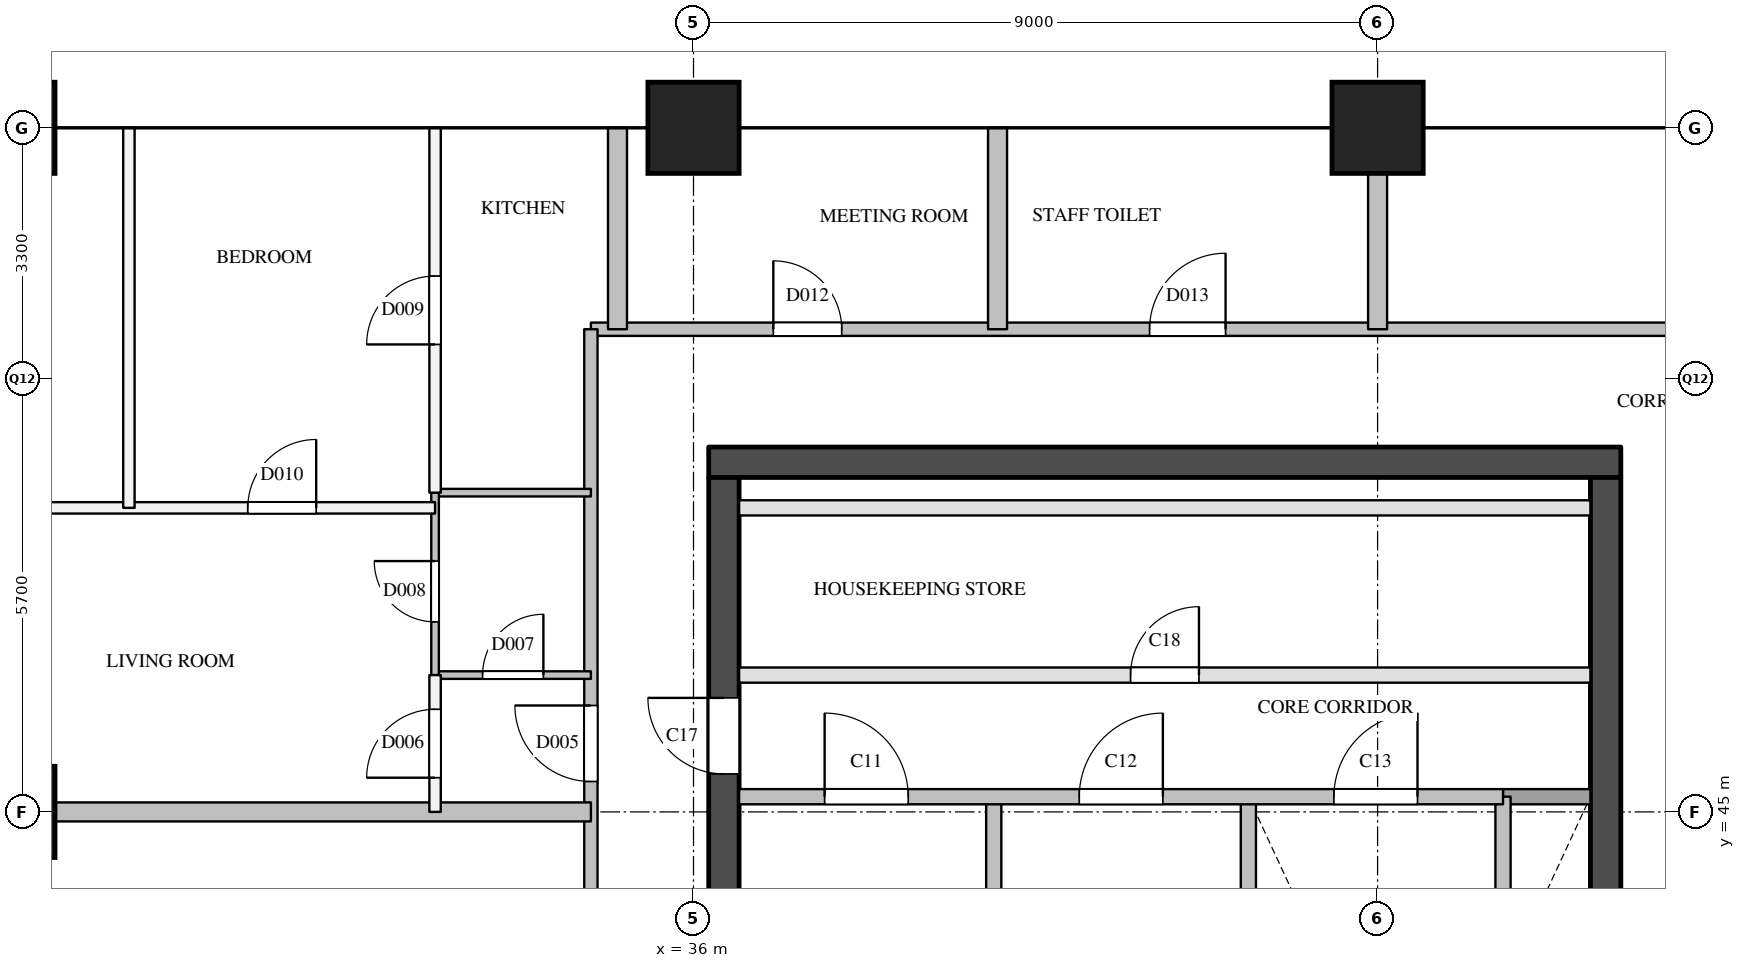
"""IFC4 building model, lengths in metres.
Left out: names, types, materials, properties, quantities, classifications, styles, units other than length and angle.
Written with IfcOpenShell. Run it as: python <this file> out.ifc"""

import sys

from ifc_helpers import new_model, si_unit, direction, frame, frame_2d, origin, origin_2d, place, context, subcontext, project, spatial, rectangle, extrude, element, fill, save


model = new_model("IFC4")
c1 = context("Model", 3, precision=1e-05, world=origin(), true_north=direction((0.0, 1.0)))
c2 = subcontext(c1, "Body", "Model", "MODEL_VIEW")
j1 = project(units=[si_unit("LENGTHUNIT", "METRE"), si_unit("PLANEANGLEUNIT", "RADIAN")], contexts=[c1])
p1 = place(None, origin())
s1 = spatial("IfcSite", under=j1, at=p1, CompositionType="ELEMENT")
p2 = place(p1, origin())
s2 = spatial("IfcBuilding", under=s1, at=p2, CompositionType="ELEMENT")
p3 = place(p2, frame((0.0, 0.0, 257.9)))
s3 = spatial("IfcBuildingStorey", under=s2, at=p3, CompositionType="ELEMENT", Elevation=257.9)
for number, where, z_axis, x_axis in (
    (1, (27.0, 45.0, 0.0), (0.0, 0.0, 1.0), (1.0, 0.0, 0.0)),
    (2, (27.0, 54.0, 0.0), (0.0, 0.0, 1.0), (1.0, 0.0, 0.0)),
    (3, (36.0, 54.0, 0.0), (0.0, 0.0, 1.0), (1.0, 0.0, 0.0)),
    (4, (45.0, 54.0, 0.0), (0.0, 0.0, 1.0), (1.0, 0.0, 0.0)),
):
    element("IfcColumn", number, at=place(p3, frame(where, z_axis=z_axis, x_axis=x_axis)), inside=s3, PredefinedType="COLUMN", context=c2, shape_type="SweptSolid", body=[
        extrude(rectangle(XDim=1.2, YDim=1.2, at=origin_2d()), origin(), (0.0, 0.0, 1.0), 3.9),
    ])
p4 = place(p3, frame((36.2, 49.6, 0.0), z_axis=(0.0, 0.0, 1.0), x_axis=(1.0, 0.0, 0.0)))
e5 = element("IfcWall", 5, at=p4, inside=s3, PredefinedType="SHEAR", context=c2, shape_type="SweptSolid", body=[
    extrude(rectangle(XDim=12.0, YDim=0.4, at=frame_2d((6.0, 0.0))), origin(), (0.0, 0.0, 1.0), 3.6),
])
p5 = place(p3, frame((36.4, 29.1, 0.0), z_axis=(0.0, 0.0, 1.0), x_axis=(0.0, 1.0, 0.0)))
e6 = element("IfcWall", 6, at=p5, inside=s3, PredefinedType="SHEAR", context=c2, shape_type="SweptSolid", body=[
    extrude(rectangle(XDim=20.3, YDim=0.4, at=frame_2d((10.15, 0.0))), origin(), (0.0, 0.0, 1.0), 3.6),
])
p6 = place(p5, frame((3.6, 0.0, 0.0)))
e7 = element("IfcOpeningElement", 7, at=p6, cuts=e6, PredefinedType="OPENING", context=c2, shape_type="SweptSolid", body=[
    extrude(rectangle(XDim=1.8, YDim=2.1, at=frame_2d((0.9, 1.05))), frame((0.0, 0.21, 0.0), z_axis=(0.0, -1.0, 0.0), x_axis=(1.0, 0.0, 0.0)), (0.0, 0.0, 1.0), 0.42),
])
p7 = place(p5, frame((16.4, 0.0, 0.0)))
e8 = element("IfcOpeningElement", 8, at=p7, cuts=e6, PredefinedType="OPENING", context=c2, shape_type="SweptSolid", body=[
    extrude(rectangle(XDim=1.0, YDim=2.1, at=frame_2d((0.5, 1.05))), frame((0.0, 0.21, 0.0), z_axis=(0.0, -1.0, 0.0), x_axis=(1.0, 0.0, 0.0)), (0.0, 0.0, 1.0), 0.42),
])
p8 = place(p3, frame((48.0, 29.1, 0.0), z_axis=(0.0, 0.0, 1.0), x_axis=(0.0, 1.0, 0.0)))
e9 = element("IfcWall", 9, at=p8, inside=s3, PredefinedType="SHEAR", context=c2, shape_type="SweptSolid", body=[
    extrude(rectangle(XDim=20.3, YDim=0.4, at=frame_2d((10.15, 0.0))), origin(), (0.0, 0.0, 1.0), 3.6),
])
p9 = place(p8, frame((12.5, 0.0, 0.0)))
e10 = element("IfcOpeningElement", 10, at=p9, cuts=e9, PredefinedType="OPENING", context=c2, shape_type="SweptSolid", body=[
    extrude(rectangle(XDim=0.7, YDim=2.1, at=frame_2d((0.35, 1.05))), frame((0.0, 0.21, 0.0), z_axis=(0.0, -1.0, 0.0), x_axis=(1.0, 0.0, 0.0)), (0.0, 0.0, 1.0), 0.42),
])
p10 = place(p8, frame((3.9, 0.0, 0.0)))
e11 = element("IfcOpeningElement", 11, at=p10, cuts=e9, PredefinedType="OPENING", context=c2, shape_type="SweptSolid", body=[
    extrude(rectangle(XDim=1.8, YDim=2.1, at=frame_2d((0.9, 1.05))), frame((0.0, 0.21, 0.0), z_axis=(0.0, -1.0, 0.0), x_axis=(1.0, 0.0, 0.0)), (0.0, 0.0, 1.0), 0.42),
])
for number, where, z_axis, x_axis in (
    (12, (39.95, 40.78, 0.0), (0.0, 0.0, 1.0), (0.0, 1.0, 0.0)),
    (13, (43.3, 40.78, 0.0), (0.0, 0.0, 1.0), (0.0, 1.0, 0.0)),
    (14, (46.65, 40.78, 0.0), (0.0, 0.0, 1.0), (0.0, 1.0, 0.0)),
):
    element("IfcWall", number, at=place(p3, frame(where, z_axis=z_axis, x_axis=x_axis)), inside=s3, PredefinedType="SOLIDWALL", context=c2, shape_type="SweptSolid", body=[
        extrude(rectangle(XDim=4.42, YDim=0.2, at=frame_2d((2.21, 0.0))), origin(), (0.0, 0.0, 1.0), 3.6),
    ])
p11 = place(p3, frame((46.65, 45.2, 0.0), z_axis=(0.0, 0.0, 1.0), x_axis=(1.0, 0.0, 0.0)))
e15 = element("IfcWall", 15, at=p11, inside=s3, PredefinedType="SOLIDWALL", context=c2, shape_type="SweptSolid", body=[
    extrude(rectangle(XDim=1.15, YDim=0.2, at=frame_2d((0.575, 0.0))), origin(), (0.0, 0.0, 1.0), 3.6),
])
p12 = place(p3, frame((36.6, 45.2, 0.0), z_axis=(0.0, 0.0, 1.0), x_axis=(1.0, 0.0, 0.0)))
e16 = element("IfcWall", 16, at=p12, inside=s3, PredefinedType="SOLIDWALL", context=c2, shape_type="SweptSolid", body=[
    extrude(rectangle(XDim=10.05, YDim=0.2, at=frame_2d((5.025, 0.0))), origin(), (0.0, 0.0, 1.0), 3.6),
])
p13 = place(p12, frame((1.125, 0.0, 0.0)))
e17 = element("IfcOpeningElement", 17, at=p13, cuts=e16, PredefinedType="OPENING", context=c2, shape_type="SweptSolid", body=[
    extrude(rectangle(XDim=1.1, YDim=2.1, at=frame_2d((0.55, 1.05))), frame((0.0, 0.11, 0.0), z_axis=(0.0, -1.0, 0.0), x_axis=(1.0, 0.0, 0.0)), (0.0, 0.0, 1.0), 0.22),
])
p14 = place(p12, frame((4.475, 0.0, 0.0)))
e18 = element("IfcOpeningElement", 18, at=p14, cuts=e16, PredefinedType="OPENING", context=c2, shape_type="SweptSolid", body=[
    extrude(rectangle(XDim=1.1, YDim=2.1, at=frame_2d((0.55, 1.05))), frame((0.0, 0.11, 0.0), z_axis=(0.0, -1.0, 0.0), x_axis=(1.0, 0.0, 0.0)), (0.0, 0.0, 1.0), 0.22),
])
p15 = place(p12, frame((7.825, 0.0, 0.0)))
e19 = element("IfcOpeningElement", 19, at=p15, cuts=e16, PredefinedType="OPENING", context=c2, shape_type="SweptSolid", body=[
    extrude(rectangle(XDim=1.1, YDim=2.1, at=frame_2d((0.55, 1.05))), frame((0.0, 0.11, 0.0), z_axis=(0.0, -1.0, 0.0), x_axis=(1.0, 0.0, 0.0)), (0.0, 0.0, 1.0), 0.22),
])
p16 = place(p3, frame((36.6, 46.8, 0.0), z_axis=(0.0, 0.0, 1.0), x_axis=(1.0, 0.0, 0.0)))
e20 = element("IfcWall", 20, at=p16, inside=s3, PredefinedType="PARTITIONING", context=c2, shape_type="SweptSolid", body=[
    extrude(rectangle(XDim=11.2, YDim=0.2, at=frame_2d((5.6, 0.0))), origin(), (0.0, 0.0, 1.0), 3.6),
])
p17 = place(p16, frame((5.15, 0.0, 0.0)))
e21 = element("IfcOpeningElement", 21, at=p17, cuts=e20, PredefinedType="OPENING", context=c2, shape_type="SweptSolid", body=[
    extrude(rectangle(XDim=0.9, YDim=2.1, at=frame_2d((0.45, 1.05))), frame((0.0, 0.11, 0.0), z_axis=(0.0, -1.0, 0.0), x_axis=(1.0, 0.0, 0.0)), (0.0, 0.0, 1.0), 0.22),
])
p18 = place(p3, frame((36.6, 49.0, 0.0), z_axis=(0.0, 0.0, 1.0), x_axis=(1.0, 0.0, 0.0)))
e22 = element("IfcWall", 22, at=p18, inside=s3, PredefinedType="PARTITIONING", context=c2, shape_type="SweptSolid", body=[
    extrude(rectangle(XDim=11.2, YDim=0.2, at=frame_2d((5.6, 0.0))), origin(), (0.0, 0.0, 1.0), 3.6),
])
p19 = place(p3, frame((34.65, 51.35, 0.0), z_axis=(0.0, 0.0, 1.0), x_axis=(1.0, 0.0, 0.0)))
e23 = element("IfcWall", 23, at=p19, inside=s3, PredefinedType="PARTITIONING", context=c2, shape_type="SweptSolid", body=[
    extrude(rectangle(XDim=15.1, YDim=0.175, at=frame_2d((7.55, 0.0))), origin(), (0.0, 0.0, 1.0), 3.6),
])
p20 = place(p19, frame((2.4, 0.0, 0.0)))
e24 = element("IfcOpeningElement", 24, at=p20, cuts=e23, PredefinedType="OPENING", context=c2, shape_type="SweptSolid", body=[
    extrude(rectangle(XDim=0.9, YDim=2.1, at=frame_2d((0.45, 1.05))), frame((0.0, 0.097, 0.0), z_axis=(0.0, -1.0, 0.0), x_axis=(1.0, 0.0, 0.0)), (0.0, 0.0, 1.0), 0.195),
])
p21 = place(p19, frame((7.35, 0.0, 0.0)))
e25 = element("IfcOpeningElement", 25, at=p21, cuts=e23, PredefinedType="OPENING", context=c2, shape_type="SweptSolid", body=[
    extrude(rectangle(XDim=1.0, YDim=2.1, at=frame_2d((0.5, 1.05))), frame((0.0, 0.097, 0.0), z_axis=(0.0, -1.0, 0.0), x_axis=(1.0, 0.0, 0.0)), (0.0, 0.0, 1.0), 0.195),
])
p22 = place(p3, frame((34.65, 28.5, 0.0), z_axis=(0.0, 0.0, 1.0), x_axis=(0.0, 1.0, 0.0)))
e26 = element("IfcWall", 26, at=p22, inside=s3, PredefinedType="PARTITIONING", context=c2, shape_type="SweptSolid", body=[
    extrude(rectangle(XDim=22.85, YDim=0.175, at=frame_2d((11.425, 0.0))), origin(), (0.0, 0.0, 1.0), 3.6),
])
p23 = place(p22, frame((5.3, 0.0, 0.0)))
e27 = element("IfcOpeningElement", 27, at=p23, cuts=e26, PredefinedType="OPENING", context=c2, shape_type="SweptSolid", body=[
    extrude(rectangle(XDim=0.9, YDim=2.1, at=frame_2d((0.45, 1.05))), frame((0.0, 0.097, 0.0), z_axis=(0.0, -1.0, 0.0), x_axis=(1.0, 0.0, 0.0)), (0.0, 0.0, 1.0), 0.195),
])
p24 = place(p22, frame((13.5, 0.0, 0.0)))
e28 = element("IfcOpeningElement", 28, at=p24, cuts=e26, PredefinedType="OPENING", context=c2, shape_type="SweptSolid", body=[
    extrude(rectangle(XDim=1.0, YDim=2.1, at=frame_2d((0.5, 1.05))), frame((0.0, 0.097, 0.0), z_axis=(0.0, -1.0, 0.0), x_axis=(1.0, 0.0, 0.0)), (0.0, 0.0, 1.0), 0.195),
])
p25 = place(p22, frame((16.9, 0.0, 0.0)))
e29 = element("IfcOpeningElement", 29, at=p25, cuts=e26, PredefinedType="OPENING", context=c2, shape_type="SweptSolid", body=[
    extrude(rectangle(XDim=1.0, YDim=2.1, at=frame_2d((0.5, 1.05))), frame((0.0, 0.097, 0.0), z_axis=(0.0, -1.0, 0.0), x_axis=(1.0, 0.0, 0.0)), (0.0, 0.0, 1.0), 0.195),
])
p26 = place(p3, frame((25.0, 49.0, 0.0), z_axis=(0.0, 0.0, 1.0), x_axis=(1.0, 0.0, 0.0)))
e30 = element("IfcWall", 30, at=p26, inside=s3, PredefinedType="PARTITIONING", context=c2, shape_type="SweptSolid", body=[
    extrude(rectangle(XDim=7.6, YDim=0.15, at=frame_2d((3.8, 0.0))), origin(), (0.0, 0.0, 1.0), 2.6),
])
p27 = place(p26, frame((5.136, 0.0, 0.0)))
e31 = element("IfcOpeningElement", 31, at=p27, cuts=e30, PredefinedType="OPENING", context=c2, shape_type="SweptSolid", body=[
    extrude(rectangle(XDim=0.9, YDim=2.1, at=frame_2d((0.45, 1.05))), frame((0.0, 0.085, 0.0), z_axis=(0.0, -1.0, 0.0), x_axis=(1.0, 0.0, 0.0)), (0.0, 0.0, 1.0), 0.17),
])
p28 = place(p26, frame((1.336, 0.0, 0.0)))
e32 = element("IfcOpeningElement", 32, at=p28, cuts=e30, PredefinedType="OPENING", context=c2, shape_type="SweptSolid", body=[
    extrude(rectangle(XDim=0.9, YDim=2.1, at=frame_2d((0.45, 1.05))), frame((0.0, 0.085, 0.0), z_axis=(0.0, -1.0, 0.0), x_axis=(1.0, 0.0, 0.0)), (0.0, 0.0, 1.0), 0.17),
])
p29 = place(p3, frame((28.572, 49.0, 0.0), z_axis=(0.0, 0.0, 1.0), x_axis=(0.0, 1.0, 0.0)))
e33 = element("IfcWall", 33, at=p29, inside=s3, PredefinedType="PARTITIONING", context=c2, shape_type="SweptSolid", body=[
    extrude(rectangle(XDim=5.0, YDim=0.15, at=frame_2d((2.5, 0.0))), origin(), (0.0, 0.0, 1.0), 2.6),
])
p30 = place(p3, frame((32.6, 45.0, 0.0), z_axis=(0.0, 0.0, 1.0), x_axis=(0.0, 1.0, 0.0)))
e34 = element("IfcWall", 34, at=p30, inside=s3, PredefinedType="PARTITIONING", context=c2, shape_type="SweptSolid", body=[
    extrude(rectangle(XDim=1.8, YDim=0.15, at=frame_2d((0.9, 0.0))), origin(), (0.0, 0.0, 1.0), 3.6),
])
p31 = place(p30, frame((0.45, 0.0, 0.0)))
e35 = element("IfcOpeningElement", 35, at=p31, cuts=e34, PredefinedType="OPENING", context=c2, shape_type="SweptSolid", body=[
    extrude(rectangle(XDim=0.9, YDim=2.1, at=frame_2d((0.45, 1.05))), frame((0.0, 0.085, 0.0), z_axis=(0.0, -1.0, 0.0), x_axis=(1.0, 0.0, 0.0)), (0.0, 0.0, 1.0), 0.17),
])
p32 = place(p3, frame((32.6, 49.2, 0.0), z_axis=(0.0, 0.0, 1.0), x_axis=(0.0, 1.0, 0.0)))
e36 = element("IfcWall", 36, at=p32, inside=s3, PredefinedType="PARTITIONING", context=c2, shape_type="SweptSolid", body=[
    extrude(rectangle(XDim=4.8, YDim=0.15, at=frame_2d((2.4, 0.0))), origin(), (0.0, 0.0, 1.0), 2.6),
])
p33 = place(p32, frame((1.95, 0.0, 0.0)))
e37 = element("IfcOpeningElement", 37, at=p33, cuts=e36, PredefinedType="OPENING", context=c2, shape_type="SweptSolid", body=[
    extrude(rectangle(XDim=0.9, YDim=2.1, at=frame_2d((0.45, 1.05))), frame((0.0, 0.085, 0.0), z_axis=(0.0, -1.0, 0.0), x_axis=(1.0, 0.0, 0.0)), (0.0, 0.0, 1.0), 0.17),
])
p34 = place(p3, frame((25.0, 45.0, 0.0), z_axis=(0.0, 0.0, 1.0), x_axis=(1.0, 0.0, 0.0)))
e38 = element("IfcWall", 38, at=p34, inside=s3, PredefinedType="PARTITIONING", context=c2, shape_type="SweptSolid", body=[
    extrude(rectangle(XDim=9.65, YDim=0.25, at=frame_2d((4.825, 0.0))), origin(), (0.0, 0.0, 1.0), 3.6),
])
for number, where, z_axis, x_axis in (
    (39, (35.0, 51.35, 0.0), (0.0, 0.0, 1.0), (0.0, 1.0, 0.0)),
    (40, (40.0, 51.35, 0.0), (0.0, 0.0, 1.0), (0.0, 1.0, 0.0)),
):
    element("IfcWall", number, at=place(p3, frame(where, z_axis=z_axis, x_axis=x_axis)), inside=s3, PredefinedType="PARTITIONING", context=c2, shape_type="SweptSolid", body=[
        extrude(rectangle(XDim=2.65, YDim=0.25, at=frame_2d((1.325, 0.0))), origin(), (0.0, 0.0, 1.0), 2.6),
    ])
p35 = place(p3, frame((45.0, 51.35, 0.0), z_axis=(0.0, 0.0, 1.0), x_axis=(0.0, 1.0, 0.0)))
e41 = element("IfcWall", 41, at=p35, inside=s3, PredefinedType="PARTITIONING", context=c2, shape_type="SweptSolid", body=[
    extrude(rectangle(XDim=2.65, YDim=0.25, at=frame_2d((1.325, 0.0))), origin(), (0.0, 0.0, 1.0), 3.6),
])
p36 = place(p3, frame((32.6, 46.8, 0.0), z_axis=(0.0, 0.0, 1.0), x_axis=(1.0, 0.0, 0.0)))
e42 = element("IfcWall", 42, at=p36, inside=s3, PredefinedType="PARTITIONING", context=c2, shape_type="SweptSolid", body=[
    extrude(rectangle(XDim=2.05, YDim=0.1, at=frame_2d((1.025, 0.0))), origin(), (0.0, 0.0, 1.0), 3.6),
])
p37 = place(p36, frame((0.625, 0.0, 0.0)))
e43 = element("IfcOpeningElement", 43, at=p37, cuts=e42, PredefinedType="OPENING", context=c2, shape_type="SweptSolid", body=[
    extrude(rectangle(XDim=0.8, YDim=2.1, at=frame_2d((0.4, 1.05))), frame((0.0, 0.06, 0.0), z_axis=(0.0, -1.0, 0.0), x_axis=(1.0, 0.0, 0.0)), (0.0, 0.0, 1.0), 0.12),
])
p38 = place(p3, frame((32.6, 49.2, 0.0), z_axis=(0.0, 0.0, 1.0), x_axis=(1.0, 0.0, 0.0)))
e44 = element("IfcWall", 44, at=p38, inside=s3, PredefinedType="PARTITIONING", context=c2, shape_type="SweptSolid", body=[
    extrude(rectangle(XDim=2.05, YDim=0.1, at=frame_2d((1.025, 0.0))), origin(), (0.0, 0.0, 1.0), 3.6),
])
p39 = place(p3, frame((32.6, 46.8, 0.0), z_axis=(0.0, 0.0, 1.0), x_axis=(0.0, 1.0, 0.0)))
e45 = element("IfcWall", 45, at=p39, inside=s3, PredefinedType="PARTITIONING", context=c2, shape_type="SweptSolid", body=[
    extrude(rectangle(XDim=2.4, YDim=0.1, at=frame_2d((1.2, 0.0))), origin(), (0.0, 0.0, 1.0), 3.6),
])
p40 = place(p39, frame((0.7, 0.0, 0.0)))
e46 = element("IfcOpeningElement", 46, at=p40, cuts=e45, PredefinedType="OPENING", context=c2, shape_type="SweptSolid", body=[
    extrude(rectangle(XDim=0.8, YDim=2.1, at=frame_2d((0.4, 1.05))), frame((0.0, 0.06, 0.0), z_axis=(0.0, -1.0, 0.0), x_axis=(1.0, 0.0, 0.0)), (0.0, 0.0, 1.0), 0.12),
])
p41 = place(p13, origin())
e47 = element("IfcDoor", 47, at=p41, inside=s3, OperationType="SINGLE_SWING_LEFT", PredefinedType="DOOR", context=c2, shape_type="SweptSolid", body=[
    extrude(rectangle(XDim=1.1, YDim=2.1, at=frame_2d((0.55, 1.05))), frame((0.0, 0.025, 0.0), z_axis=(0.0, -1.0, 0.0), x_axis=(1.0, 0.0, 0.0)), (0.0, 0.0, 1.0), 0.05),
])
fill(e17, e47)
p42 = place(p14, origin())
e48 = element("IfcDoor", 48, at=p42, inside=s3, OperationType="SINGLE_SWING_RIGHT", PredefinedType="DOOR", context=c2, shape_type="SweptSolid", body=[
    extrude(rectangle(XDim=1.1, YDim=2.1, at=frame_2d((0.55, 1.05))), frame((0.0, 0.025, 0.0), z_axis=(0.0, -1.0, 0.0), x_axis=(1.0, 0.0, 0.0)), (0.0, 0.0, 1.0), 0.05),
])
fill(e18, e48)
p43 = place(p15, origin())
e49 = element("IfcDoor", 49, at=p43, inside=s3, OperationType="SINGLE_SWING_RIGHT", PredefinedType="DOOR", context=c2, shape_type="SweptSolid", body=[
    extrude(rectangle(XDim=1.1, YDim=2.1, at=frame_2d((0.55, 1.05))), frame((0.0, 0.025, 0.0), z_axis=(0.0, -1.0, 0.0), x_axis=(1.0, 0.0, 0.0)), (0.0, 0.0, 1.0), 0.05),
])
fill(e19, e49)
p44 = place(p7, origin())
e50 = element("IfcDoor", 50, at=p44, inside=s3, OperationType="SINGLE_SWING_RIGHT", PredefinedType="DOOR", context=c2, shape_type="SweptSolid", body=[
    extrude(rectangle(XDim=1.0, YDim=2.1, at=frame_2d((0.5, 1.05))), frame((0.0, 0.025, 0.0), z_axis=(0.0, -1.0, 0.0), x_axis=(1.0, 0.0, 0.0)), (0.0, 0.0, 1.0), 0.05),
])
fill(e8, e50)
p45 = place(p17, origin())
e51 = element("IfcDoor", 51, at=p45, inside=s3, OperationType="SINGLE_SWING_RIGHT", PredefinedType="DOOR", context=c2, shape_type="SweptSolid", body=[
    extrude(rectangle(XDim=0.9, YDim=2.1, at=frame_2d((0.45, 1.05))), frame((0.0, 0.025, 0.0), z_axis=(0.0, -1.0, 0.0), x_axis=(1.0, 0.0, 0.0)), (0.0, 0.0, 1.0), 0.05),
])
fill(e21, e51)
p46 = place(p25, origin())
e52 = element("IfcDoor", 52, at=p46, inside=s3, OperationType="SINGLE_SWING_RIGHT", PredefinedType="DOOR", context=c2, shape_type="SweptSolid", body=[
    extrude(rectangle(XDim=1.0, YDim=2.1, at=frame_2d((0.5, 1.05))), frame((0.0, 0.025, 0.0), z_axis=(0.0, -1.0, 0.0), x_axis=(1.0, 0.0, 0.0)), (0.0, 0.0, 1.0), 0.05),
])
fill(e29, e52)
p47 = place(p31, origin())
e53 = element("IfcDoor", 53, at=p47, inside=s3, OperationType="SINGLE_SWING_LEFT", PredefinedType="DOOR", context=c2, shape_type="SweptSolid", body=[
    extrude(rectangle(XDim=0.9, YDim=2.1, at=frame_2d((0.45, 1.05))), frame((0.0, 0.025, 0.0), z_axis=(0.0, -1.0, 0.0), x_axis=(1.0, 0.0, 0.0)), (0.0, 0.0, 1.0), 0.05),
])
fill(e35, e53)
p48 = place(p37, origin())
e54 = element("IfcDoor", 54, at=p48, inside=s3, OperationType="SINGLE_SWING_RIGHT", PredefinedType="DOOR", context=c2, shape_type="SweptSolid", body=[
    extrude(rectangle(XDim=0.8, YDim=2.1, at=frame_2d((0.4, 1.05))), frame((0.0, 0.025, 0.0), z_axis=(0.0, -1.0, 0.0), x_axis=(1.0, 0.0, 0.0)), (0.0, 0.0, 1.0), 0.05),
])
fill(e43, e54)
p49 = place(p40, origin())
e55 = element("IfcDoor", 55, at=p49, inside=s3, OperationType="SINGLE_SWING_RIGHT", PredefinedType="DOOR", context=c2, shape_type="SweptSolid", body=[
    extrude(rectangle(XDim=0.8, YDim=2.1, at=frame_2d((0.4, 1.05))), frame((0.0, 0.025, 0.0), z_axis=(0.0, -1.0, 0.0), x_axis=(1.0, 0.0, 0.0)), (0.0, 0.0, 1.0), 0.05),
])
fill(e46, e55)
p50 = place(p33, origin())
e56 = element("IfcDoor", 56, at=p50, inside=s3, OperationType="SINGLE_SWING_LEFT", PredefinedType="DOOR", context=c2, shape_type="SweptSolid", body=[
    extrude(rectangle(XDim=0.9, YDim=2.1, at=frame_2d((0.45, 1.05))), frame((0.0, 0.025, 0.0), z_axis=(0.0, -1.0, 0.0), x_axis=(1.0, 0.0, 0.0)), (0.0, 0.0, 1.0), 0.05),
])
fill(e37, e56)
p51 = place(p27, origin())
e57 = element("IfcDoor", 57, at=p51, inside=s3, OperationType="SINGLE_SWING_RIGHT", PredefinedType="DOOR", context=c2, shape_type="SweptSolid", body=[
    extrude(rectangle(XDim=0.9, YDim=2.1, at=frame_2d((0.45, 1.05))), frame((0.0, 0.025, 0.0), z_axis=(0.0, -1.0, 0.0), x_axis=(1.0, 0.0, 0.0)), (0.0, 0.0, 1.0), 0.05),
])
fill(e31, e57)
p52 = place(p20, origin())
e58 = element("IfcDoor", 58, at=p52, inside=s3, OperationType="SINGLE_SWING_LEFT", PredefinedType="DOOR", context=c2, shape_type="SweptSolid", body=[
    extrude(rectangle(XDim=0.9, YDim=2.1, at=frame_2d((0.45, 1.05))), frame((0.0, 0.025, 0.0), z_axis=(0.0, -1.0, 0.0), x_axis=(1.0, 0.0, 0.0)), (0.0, 0.0, 1.0), 0.05),
])
fill(e24, e58)
p53 = place(p21, origin())
e59 = element("IfcDoor", 59, at=p53, inside=s3, OperationType="SINGLE_SWING_RIGHT", PredefinedType="DOOR", context=c2, shape_type="SweptSolid", body=[
    extrude(rectangle(XDim=1.0, YDim=2.1, at=frame_2d((0.5, 1.05))), frame((0.0, 0.025, 0.0), z_axis=(0.0, -1.0, 0.0), x_axis=(1.0, 0.0, 0.0)), (0.0, 0.0, 1.0), 0.05),
])
fill(e25, e59)
save(model, sys.argv[1])
